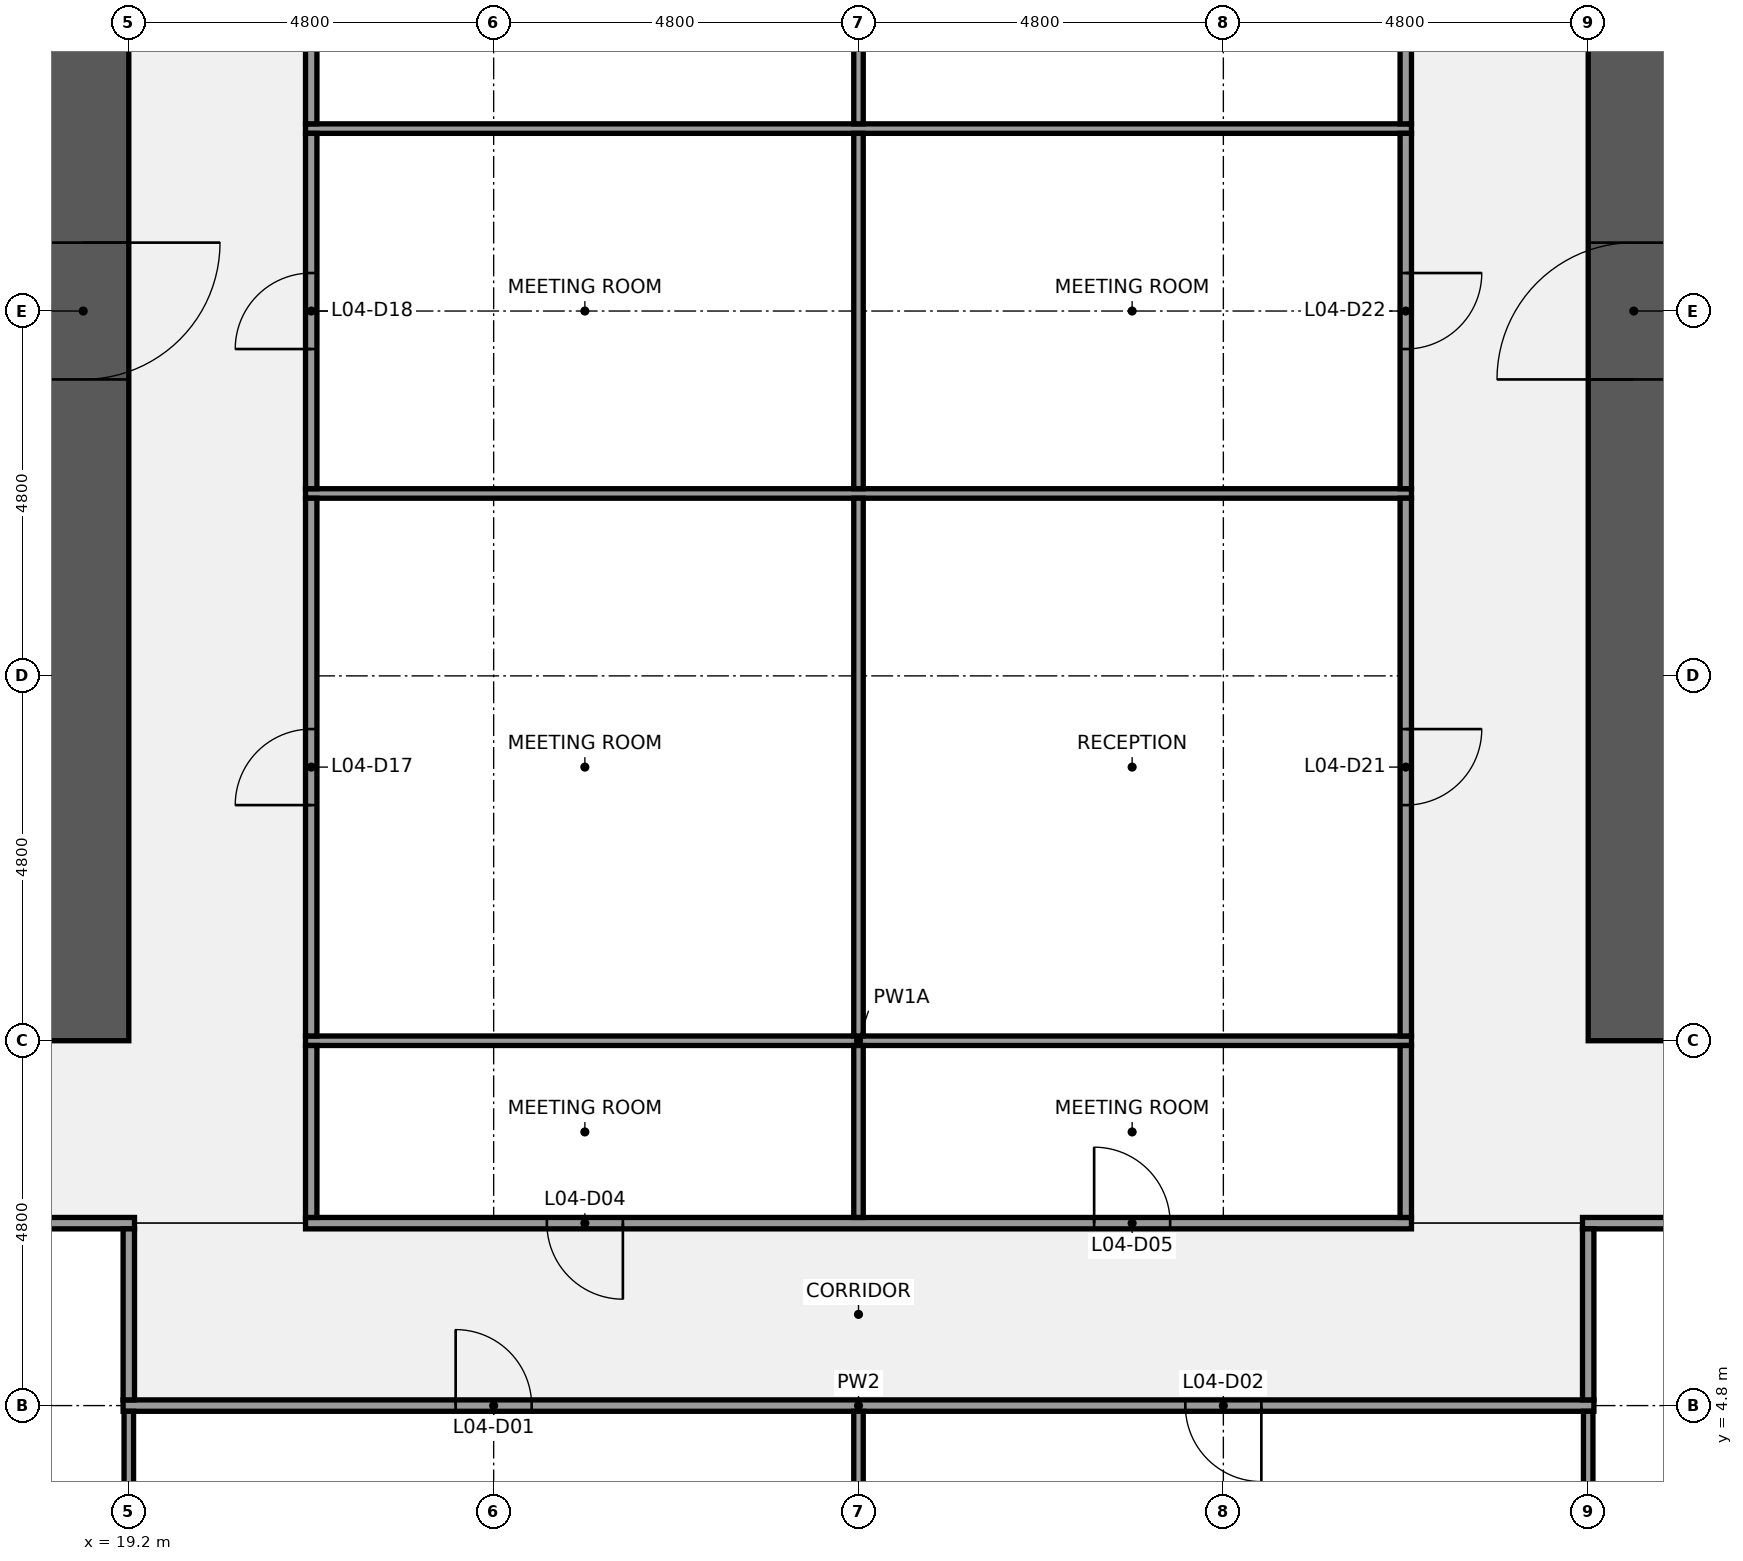
"""IFC4 building model, lengths in metres.
Left out: names, types, materials, properties, quantities, classifications, styles, units other than length and angle.
Written with IfcOpenShell. Run it as: python <this file> out.ifc"""

import sys

from ifc_helpers import new_model, si_unit, direction, frame, frame_2d, origin, place, context, subcontext, project, spatial, rectangle, extrude, element, fill, save


model = new_model("IFC4")
c1 = context("Model", 3, precision=1e-05, world=origin(), true_north=direction((0.0, 1.0)))
c2 = subcontext(c1, "Body", "Model", "MODEL_VIEW")
j1 = project(units=[si_unit("LENGTHUNIT", "METRE"), si_unit("PLANEANGLEUNIT", "RADIAN")], contexts=[c1])
p1 = place(None, origin())
s1 = spatial("IfcSite", under=j1, at=p1, CompositionType="ELEMENT")
p2 = place(p1, origin())
s2 = spatial("IfcBuilding", under=s1, at=p2, CompositionType="ELEMENT")
p3 = place(p2, frame((0.0, 0.0, 25.8)))
s3 = spatial("IfcBuildingStorey", under=s2, at=p3, CompositionType="ELEMENT", Elevation=25.8)
p4 = place(p3, frame((18.6, 38.4, 0.0), z_axis=(0.0, 0.0, 1.0), x_axis=(0.0, -1.0, 0.0)))
e1 = element("IfcWall", 1, at=p4, inside=s3, PredefinedType="SHEAR", context=c2, shape_type="SweptSolid", body=[
    extrude(rectangle(XDim=28.8, YDim=1.2, at=frame_2d((14.4, 0.0))), origin(), (0.0, 0.0, 1.0), 4.24),
])
p5 = place(p4, frame((18.3, 0.0, 0.0)))
e2 = element("IfcOpeningElement", 2, at=p5, cuts=e1, PredefinedType="OPENING", context=c2, shape_type="SweptSolid", body=[
    extrude(rectangle(XDim=1.8, YDim=2.1, at=frame_2d((0.9, 1.05))), frame((0.0, 0.61, 0.0), z_axis=(0.0, -1.0, 0.0), x_axis=(1.0, 0.0, 0.0)), (0.0, 0.0, 1.0), 1.22),
])
p6 = place(p4, frame((8.7, 0.0, 0.0)))
e3 = element("IfcOpeningElement", 3, at=p6, cuts=e1, PredefinedType="OPENING", context=c2, shape_type="SweptSolid", body=[
    extrude(rectangle(XDim=1.8, YDim=2.1, at=frame_2d((0.9, 1.05))), frame((0.0, 0.61, 0.0), z_axis=(0.0, -1.0, 0.0), x_axis=(1.0, 0.0, 0.0)), (0.0, 0.0, 1.0), 1.22),
])
p7 = place(p3, frame((39.0, 9.6, 0.0), z_axis=(0.0, 0.0, 1.0), x_axis=(0.0, 1.0, 0.0)))
e4 = element("IfcWall", 4, at=p7, inside=s3, PredefinedType="SHEAR", context=c2, shape_type="SweptSolid", body=[
    extrude(rectangle(XDim=28.8, YDim=1.2, at=frame_2d((14.4, 0.0))), origin(), (0.0, 0.0, 1.0), 4.24),
])
p8 = place(p7, frame((8.7, 0.0, 0.0)))
e5 = element("IfcOpeningElement", 5, at=p8, cuts=e4, PredefinedType="OPENING", context=c2, shape_type="SweptSolid", body=[
    extrude(rectangle(XDim=1.8, YDim=2.1, at=frame_2d((0.9, 1.05))), frame((0.0, 0.61, 0.0), z_axis=(0.0, -1.0, 0.0), x_axis=(1.0, 0.0, 0.0)), (0.0, 0.0, 1.0), 1.22),
])
p9 = place(p7, frame((18.3, 0.0, 0.0)))
e6 = element("IfcOpeningElement", 6, at=p9, cuts=e4, PredefinedType="OPENING", context=c2, shape_type="SweptSolid", body=[
    extrude(rectangle(XDim=1.8, YDim=2.1, at=frame_2d((0.9, 1.05))), frame((0.0, 0.61, 0.0), z_axis=(0.0, -1.0, 0.0), x_axis=(1.0, 0.0, 0.0)), (0.0, 0.0, 1.0), 1.22),
])
p10 = place(p3, frame((19.125, 4.8, 0.0), z_axis=(0.0, 0.0, 1.0), x_axis=(1.0, 0.0, 0.0)))
e7 = element("IfcWall", 7, at=p10, inside=s3, PredefinedType="PARTITIONING", context=c2, shape_type="SweptSolid", body=[
    extrude(rectangle(XDim=19.35, YDim=0.15, at=frame_2d((9.675, 0.0))), origin(), (0.0, 0.0, 1.0), 3.27),
])
p11 = place(p10, frame((4.375, 0.0, 0.0)))
e8 = element("IfcOpeningElement", 8, at=p11, cuts=e7, PredefinedType="OPENING", context=c2, shape_type="SweptSolid", body=[
    extrude(rectangle(XDim=1.0, YDim=2.1, at=frame_2d((0.5, 1.05))), frame((0.0, 0.085, 0.0), z_axis=(0.0, -1.0, 0.0), x_axis=(1.0, 0.0, 0.0)), (0.0, 0.0, 1.0), 0.17),
])
p12 = place(p10, frame((13.975, 0.0, 0.0)))
e9 = element("IfcOpeningElement", 9, at=p12, cuts=e7, PredefinedType="OPENING", context=c2, shape_type="SweptSolid", body=[
    extrude(rectangle(XDim=1.0, YDim=2.1, at=frame_2d((0.5, 1.05))), frame((0.0, 0.085, 0.0), z_axis=(0.0, -1.0, 0.0), x_axis=(1.0, 0.0, 0.0)), (0.0, 0.0, 1.0), 0.17),
])
p13 = place(p3, frame((14.325, 7.2, 0.0), z_axis=(0.0, 0.0, 1.0), x_axis=(1.0, 0.0, 0.0)))
e10 = element("IfcWall", 10, at=p13, inside=s3, PredefinedType="PARTITIONING", context=c2, shape_type="SweptSolid", body=[
    extrude(rectangle(XDim=4.95, YDim=0.15, at=frame_2d((2.475, 0.0))), origin(), (0.0, 0.0, 1.0), 3.27),
])
p14 = place(p13, frame((1.975, 0.0, 0.0)))
e11 = element("IfcOpeningElement", 11, at=p14, cuts=e10, PredefinedType="OPENING", context=c2, shape_type="SweptSolid", body=[
    extrude(rectangle(XDim=1.0, YDim=2.1, at=frame_2d((0.5, 1.05))), frame((0.0, 0.085, 0.0), z_axis=(0.0, -1.0, 0.0), x_axis=(1.0, 0.0, 0.0)), (0.0, 0.0, 1.0), 0.17),
])
p15 = place(p3, frame((21.525, 7.2, 0.0), z_axis=(0.0, 0.0, 1.0), x_axis=(1.0, 0.0, 0.0)))
e12 = element("IfcWall", 12, at=p15, inside=s3, PredefinedType="PARTITIONING", context=c2, shape_type="SweptSolid", body=[
    extrude(rectangle(XDim=14.55, YDim=0.15, at=frame_2d((7.275, 0.0))), origin(), (0.0, 0.0, 1.0), 3.27),
])
p16 = place(p15, frame((3.175, 0.0, 0.0)))
e13 = element("IfcOpeningElement", 13, at=p16, cuts=e12, PredefinedType="OPENING", context=c2, shape_type="SweptSolid", body=[
    extrude(rectangle(XDim=1.0, YDim=2.1, at=frame_2d((0.5, 1.05))), frame((0.0, 0.085, 0.0), z_axis=(0.0, -1.0, 0.0), x_axis=(1.0, 0.0, 0.0)), (0.0, 0.0, 1.0), 0.17),
])
p17 = place(p15, frame((10.375, 0.0, 0.0)))
e14 = element("IfcOpeningElement", 14, at=p17, cuts=e12, PredefinedType="OPENING", context=c2, shape_type="SweptSolid", body=[
    extrude(rectangle(XDim=1.0, YDim=2.1, at=frame_2d((0.5, 1.05))), frame((0.0, 0.085, 0.0), z_axis=(0.0, -1.0, 0.0), x_axis=(1.0, 0.0, 0.0)), (0.0, 0.0, 1.0), 0.17),
])
p18 = place(p3, frame((38.325, 7.2, 0.0), z_axis=(0.0, 0.0, 1.0), x_axis=(1.0, 0.0, 0.0)))
e15 = element("IfcWall", 15, at=p18, inside=s3, PredefinedType="PARTITIONING", context=c2, shape_type="SweptSolid", body=[
    extrude(rectangle(XDim=4.95, YDim=0.15, at=frame_2d((2.475, 0.0))), origin(), (0.0, 0.0, 1.0), 3.27),
])
p19 = place(p18, frame((1.975, 0.0, 0.0)))
e16 = element("IfcOpeningElement", 16, at=p19, cuts=e15, PredefinedType="OPENING", context=c2, shape_type="SweptSolid", body=[
    extrude(rectangle(XDim=1.0, YDim=2.1, at=frame_2d((0.5, 1.05))), frame((0.0, 0.085, 0.0), z_axis=(0.0, -1.0, 0.0), x_axis=(1.0, 0.0, 0.0)), (0.0, 0.0, 1.0), 0.17),
])
for number, where, z_axis, x_axis in (
    (17, (21.525, 9.6, 0.0), (0.0, 0.0, 1.0), (1.0, 0.0, 0.0)),
    (18, (21.525, 16.8, 0.0), (0.0, 0.0, 1.0), (1.0, 0.0, 0.0)),
    (19, (21.525, 21.6, 0.0), (0.0, 0.0, 1.0), (1.0, 0.0, 0.0)),
):
    element("IfcWall", number, at=place(p3, frame(where, z_axis=z_axis, x_axis=x_axis)), inside=s3, PredefinedType="PARTITIONING", context=c2, shape_type="SweptSolid", body=[
        extrude(rectangle(XDim=14.55, YDim=0.125, at=frame_2d((7.275, 0.0))), origin(), (0.0, 0.0, 1.0), 3.27),
    ])
p20 = place(p3, frame((19.2, 0.65, 0.0), z_axis=(0.0, 0.0, 1.0), x_axis=(0.0, 1.0, 0.0)))
e20 = element("IfcWall", 20, at=p20, inside=s3, PredefinedType="PARTITIONING", context=c2, shape_type="SweptSolid", body=[
    extrude(rectangle(XDim=4.075, YDim=0.125, at=frame_2d((2.038, 0.0))), origin(), (0.0, 0.0, 1.0), 3.27),
])
p21 = place(p3, frame((19.2, 4.875, 0.0), z_axis=(0.0, 0.0, 1.0), x_axis=(0.0, 1.0, 0.0)))
e21 = element("IfcWall", 21, at=p21, inside=s3, PredefinedType="PARTITIONING", context=c2, shape_type="SweptSolid", body=[
    extrude(rectangle(XDim=2.25, YDim=0.15, at=frame_2d((1.125, 0.0))), origin(), (0.0, 0.0, 1.0), 3.27),
])
p22 = place(p3, frame((21.6, 7.275, 0.0), z_axis=(0.0, 0.0, 1.0), x_axis=(0.0, 1.0, 0.0)))
e22 = element("IfcWall", 22, at=p22, inside=s3, PredefinedType="PARTITIONING", context=c2, shape_type="SweptSolid", body=[
    extrude(rectangle(XDim=2.263, YDim=0.15, at=frame_2d((1.131, 0.0))), origin(), (0.0, 0.0, 1.0), 3.27),
])
p23 = place(p3, frame((21.6, 9.663, 0.0), z_axis=(0.0, 0.0, 1.0), x_axis=(0.0, 1.0, 0.0)))
e23 = element("IfcWall", 23, at=p23, inside=s3, PredefinedType="PARTITIONING", context=c2, shape_type="SweptSolid", body=[
    extrude(rectangle(XDim=7.075, YDim=0.15, at=frame_2d((3.538, 0.0))), origin(), (0.0, 0.0, 1.0), 3.27),
])
p24 = place(p23, frame((3.038, 0.0, 0.0)))
e24 = element("IfcOpeningElement", 24, at=p24, cuts=e23, PredefinedType="OPENING", context=c2, shape_type="SweptSolid", body=[
    extrude(rectangle(XDim=1.0, YDim=2.1, at=frame_2d((0.5, 1.05))), frame((0.0, 0.085, 0.0), z_axis=(0.0, -1.0, 0.0), x_axis=(1.0, 0.0, 0.0)), (0.0, 0.0, 1.0), 0.17),
])
p25 = place(p3, frame((21.6, 16.863, 0.0), z_axis=(0.0, 0.0, 1.0), x_axis=(0.0, 1.0, 0.0)))
e25 = element("IfcWall", 25, at=p25, inside=s3, PredefinedType="PARTITIONING", context=c2, shape_type="SweptSolid", body=[
    extrude(rectangle(XDim=4.675, YDim=0.15, at=frame_2d((2.337, 0.0))), origin(), (0.0, 0.0, 1.0), 3.27),
])
p26 = place(p25, frame((1.837, 0.0, 0.0)))
e26 = element("IfcOpeningElement", 26, at=p26, cuts=e25, PredefinedType="OPENING", context=c2, shape_type="SweptSolid", body=[
    extrude(rectangle(XDim=1.0, YDim=2.1, at=frame_2d((0.5, 1.05))), frame((0.0, 0.085, 0.0), z_axis=(0.0, -1.0, 0.0), x_axis=(1.0, 0.0, 0.0)), (0.0, 0.0, 1.0), 0.17),
])
p27 = place(p3, frame((21.6, 21.663, 0.0), z_axis=(0.0, 0.0, 1.0), x_axis=(0.0, 1.0, 0.0)))
e27 = element("IfcWall", 27, at=p27, inside=s3, PredefinedType="PARTITIONING", context=c2, shape_type="SweptSolid", body=[
    extrude(rectangle(XDim=7.075, YDim=0.15, at=frame_2d((3.538, 0.0))), origin(), (0.0, 0.0, 1.0), 3.27),
])
p28 = place(p27, frame((3.038, 0.0, 0.0)))
e28 = element("IfcOpeningElement", 28, at=p28, cuts=e27, PredefinedType="OPENING", context=c2, shape_type="SweptSolid", body=[
    extrude(rectangle(XDim=1.0, YDim=2.1, at=frame_2d((0.5, 1.05))), frame((0.0, 0.085, 0.0), z_axis=(0.0, -1.0, 0.0), x_axis=(1.0, 0.0, 0.0)), (0.0, 0.0, 1.0), 0.17),
])
p29 = place(p3, frame((28.8, 0.65, 0.0), z_axis=(0.0, 0.0, 1.0), x_axis=(0.0, 1.0, 0.0)))
e29 = element("IfcWall", 29, at=p29, inside=s3, PredefinedType="PARTITIONING", context=c2, shape_type="SweptSolid", body=[
    extrude(rectangle(XDim=4.075, YDim=0.125, at=frame_2d((2.038, 0.0))), origin(), (0.0, 0.0, 1.0), 3.27),
])
p30 = place(p3, frame((28.8, 7.275, 0.0), z_axis=(0.0, 0.0, 1.0), x_axis=(0.0, 1.0, 0.0)))
e30 = element("IfcWall", 30, at=p30, inside=s3, PredefinedType="PARTITIONING", context=c2, shape_type="SweptSolid", body=[
    extrude(rectangle(XDim=2.263, YDim=0.125, at=frame_2d((1.131, 0.0))), origin(), (0.0, 0.0, 1.0), 3.27),
])
p31 = place(p3, frame((28.8, 9.663, 0.0), z_axis=(0.0, 0.0, 1.0), x_axis=(0.0, 1.0, 0.0)))
e31 = element("IfcWall", 31, at=p31, inside=s3, PredefinedType="PARTITIONING", context=c2, shape_type="SweptSolid", body=[
    extrude(rectangle(XDim=7.075, YDim=0.125, at=frame_2d((3.538, 0.0))), origin(), (0.0, 0.0, 1.0), 3.27),
])
p32 = place(p3, frame((28.8, 16.863, 0.0), z_axis=(0.0, 0.0, 1.0), x_axis=(0.0, 1.0, 0.0)))
e32 = element("IfcWall", 32, at=p32, inside=s3, PredefinedType="PARTITIONING", context=c2, shape_type="SweptSolid", body=[
    extrude(rectangle(XDim=4.675, YDim=0.125, at=frame_2d((2.337, 0.0))), origin(), (0.0, 0.0, 1.0), 3.27),
])
p33 = place(p3, frame((28.8, 21.663, 0.0), z_axis=(0.0, 0.0, 1.0), x_axis=(0.0, 1.0, 0.0)))
e33 = element("IfcWall", 33, at=p33, inside=s3, PredefinedType="PARTITIONING", context=c2, shape_type="SweptSolid", body=[
    extrude(rectangle(XDim=7.075, YDim=0.125, at=frame_2d((3.538, 0.0))), origin(), (0.0, 0.0, 1.0), 3.27),
])
p34 = place(p3, frame((36.0, 7.275, 0.0), z_axis=(0.0, 0.0, 1.0), x_axis=(0.0, 1.0, 0.0)))
e34 = element("IfcWall", 34, at=p34, inside=s3, PredefinedType="PARTITIONING", context=c2, shape_type="SweptSolid", body=[
    extrude(rectangle(XDim=2.263, YDim=0.15, at=frame_2d((1.131, 0.0))), origin(), (0.0, 0.0, 1.0), 3.27),
])
p35 = place(p3, frame((36.0, 9.663, 0.0), z_axis=(0.0, 0.0, 1.0), x_axis=(0.0, 1.0, 0.0)))
e35 = element("IfcWall", 35, at=p35, inside=s3, PredefinedType="PARTITIONING", context=c2, shape_type="SweptSolid", body=[
    extrude(rectangle(XDim=7.075, YDim=0.15, at=frame_2d((3.538, 0.0))), origin(), (0.0, 0.0, 1.0), 3.27),
])
p36 = place(p35, frame((3.038, 0.0, 0.0)))
e36 = element("IfcOpeningElement", 36, at=p36, cuts=e35, PredefinedType="OPENING", context=c2, shape_type="SweptSolid", body=[
    extrude(rectangle(XDim=1.0, YDim=2.1, at=frame_2d((0.5, 1.05))), frame((0.0, 0.085, 0.0), z_axis=(0.0, -1.0, 0.0), x_axis=(1.0, 0.0, 0.0)), (0.0, 0.0, 1.0), 0.17),
])
p37 = place(p3, frame((36.0, 16.863, 0.0), z_axis=(0.0, 0.0, 1.0), x_axis=(0.0, 1.0, 0.0)))
e37 = element("IfcWall", 37, at=p37, inside=s3, PredefinedType="PARTITIONING", context=c2, shape_type="SweptSolid", body=[
    extrude(rectangle(XDim=4.675, YDim=0.15, at=frame_2d((2.337, 0.0))), origin(), (0.0, 0.0, 1.0), 3.27),
])
p38 = place(p37, frame((1.837, 0.0, 0.0)))
e38 = element("IfcOpeningElement", 38, at=p38, cuts=e37, PredefinedType="OPENING", context=c2, shape_type="SweptSolid", body=[
    extrude(rectangle(XDim=1.0, YDim=2.1, at=frame_2d((0.5, 1.05))), frame((0.0, 0.085, 0.0), z_axis=(0.0, -1.0, 0.0), x_axis=(1.0, 0.0, 0.0)), (0.0, 0.0, 1.0), 0.17),
])
p39 = place(p3, frame((36.0, 21.663, 0.0), z_axis=(0.0, 0.0, 1.0), x_axis=(0.0, 1.0, 0.0)))
e39 = element("IfcWall", 39, at=p39, inside=s3, PredefinedType="PARTITIONING", context=c2, shape_type="SweptSolid", body=[
    extrude(rectangle(XDim=7.075, YDim=0.15, at=frame_2d((3.538, 0.0))), origin(), (0.0, 0.0, 1.0), 3.27),
])
p40 = place(p39, frame((3.038, 0.0, 0.0)))
e40 = element("IfcOpeningElement", 40, at=p40, cuts=e39, PredefinedType="OPENING", context=c2, shape_type="SweptSolid", body=[
    extrude(rectangle(XDim=1.0, YDim=2.1, at=frame_2d((0.5, 1.05))), frame((0.0, 0.085, 0.0), z_axis=(0.0, -1.0, 0.0), x_axis=(1.0, 0.0, 0.0)), (0.0, 0.0, 1.0), 0.17),
])
p41 = place(p3, frame((38.4, 0.65, 0.0), z_axis=(0.0, 0.0, 1.0), x_axis=(0.0, 1.0, 0.0)))
e41 = element("IfcWall", 41, at=p41, inside=s3, PredefinedType="PARTITIONING", context=c2, shape_type="SweptSolid", body=[
    extrude(rectangle(XDim=4.075, YDim=0.125, at=frame_2d((2.038, 0.0))), origin(), (0.0, 0.0, 1.0), 3.27),
])
p42 = place(p3, frame((38.4, 4.875, 0.0), z_axis=(0.0, 0.0, 1.0), x_axis=(0.0, 1.0, 0.0)))
e42 = element("IfcWall", 42, at=p42, inside=s3, PredefinedType="PARTITIONING", context=c2, shape_type="SweptSolid", body=[
    extrude(rectangle(XDim=2.25, YDim=0.15, at=frame_2d((1.125, 0.0))), origin(), (0.0, 0.0, 1.0), 3.27),
])
p43 = place(p5, origin())
e43 = element("IfcDoor", 43, at=p43, inside=s3, OperationType="DOUBLE_DOOR_SINGLE_SWING", PredefinedType="DOOR", context=c2, shape_type="SweptSolid", body=[
    extrude(rectangle(XDim=1.8, YDim=2.1, at=frame_2d((0.9, 1.05))), frame((0.0, 0.025, 0.0), z_axis=(0.0, -1.0, 0.0), x_axis=(1.0, 0.0, 0.0)), (0.0, 0.0, 1.0), 0.05),
])
fill(e2, e43)
p44 = place(p8, origin())
e44 = element("IfcDoor", 44, at=p44, inside=s3, OperationType="DOUBLE_DOOR_SINGLE_SWING", PredefinedType="DOOR", context=c2, shape_type="SweptSolid", body=[
    extrude(rectangle(XDim=1.8, YDim=2.1, at=frame_2d((0.9, 1.05))), frame((0.0, 0.025, 0.0), z_axis=(0.0, -1.0, 0.0), x_axis=(1.0, 0.0, 0.0)), (0.0, 0.0, 1.0), 0.05),
])
fill(e5, e44)
p45 = place(p11, origin())
e45 = element("IfcDoor", 45, at=p45, inside=s3, OperationType="SINGLE_SWING_LEFT", PredefinedType="DOOR", context=c2, shape_type="SweptSolid", body=[
    extrude(rectangle(XDim=1.0, YDim=2.1, at=frame_2d((0.5, 1.05))), frame((0.0, 0.025, 0.0), z_axis=(0.0, -1.0, 0.0), x_axis=(1.0, 0.0, 0.0)), (0.0, 0.0, 1.0), 0.05),
])
fill(e8, e45)
p46 = place(p12, origin())
e46 = element("IfcDoor", 46, at=p46, inside=s3, OperationType="SINGLE_SWING_RIGHT", PredefinedType="DOOR", context=c2, shape_type="SweptSolid", body=[
    extrude(rectangle(XDim=1.0, YDim=2.1, at=frame_2d((0.5, 1.05))), frame((0.0, 0.025, 0.0), z_axis=(0.0, -1.0, 0.0), x_axis=(1.0, 0.0, 0.0)), (0.0, 0.0, 1.0), 0.05),
])
fill(e9, e46)
p47 = place(p16, origin())
e47 = element("IfcDoor", 47, at=p47, inside=s3, OperationType="SINGLE_SWING_RIGHT", PredefinedType="DOOR", context=c2, shape_type="SweptSolid", body=[
    extrude(rectangle(XDim=1.0, YDim=2.1, at=frame_2d((0.5, 1.05))), frame((0.0, 0.025, 0.0), z_axis=(0.0, -1.0, 0.0), x_axis=(1.0, 0.0, 0.0)), (0.0, 0.0, 1.0), 0.05),
])
fill(e13, e47)
p48 = place(p17, origin())
e48 = element("IfcDoor", 48, at=p48, inside=s3, OperationType="SINGLE_SWING_LEFT", PredefinedType="DOOR", context=c2, shape_type="SweptSolid", body=[
    extrude(rectangle(XDim=1.0, YDim=2.1, at=frame_2d((0.5, 1.05))), frame((0.0, 0.025, 0.0), z_axis=(0.0, -1.0, 0.0), x_axis=(1.0, 0.0, 0.0)), (0.0, 0.0, 1.0), 0.05),
])
fill(e14, e48)
p49 = place(p24, origin())
e49 = element("IfcDoor", 49, at=p49, inside=s3, OperationType="SINGLE_SWING_LEFT", PredefinedType="DOOR", context=c2, shape_type="SweptSolid", body=[
    extrude(rectangle(XDim=1.0, YDim=2.1, at=frame_2d((0.5, 1.05))), frame((0.0, 0.025, 0.0), z_axis=(0.0, -1.0, 0.0), x_axis=(1.0, 0.0, 0.0)), (0.0, 0.0, 1.0), 0.05),
])
fill(e24, e49)
p50 = place(p26, origin())
e50 = element("IfcDoor", 50, at=p50, inside=s3, OperationType="SINGLE_SWING_LEFT", PredefinedType="DOOR", context=c2, shape_type="SweptSolid", body=[
    extrude(rectangle(XDim=1.0, YDim=2.1, at=frame_2d((0.5, 1.05))), frame((0.0, 0.025, 0.0), z_axis=(0.0, -1.0, 0.0), x_axis=(1.0, 0.0, 0.0)), (0.0, 0.0, 1.0), 0.05),
])
fill(e26, e50)
p51 = place(p36, origin())
e51 = element("IfcDoor", 51, at=p51, inside=s3, OperationType="SINGLE_SWING_RIGHT", PredefinedType="DOOR", context=c2, shape_type="SweptSolid", body=[
    extrude(rectangle(XDim=1.0, YDim=2.1, at=frame_2d((0.5, 1.05))), frame((0.0, 0.025, 0.0), z_axis=(0.0, -1.0, 0.0), x_axis=(1.0, 0.0, 0.0)), (0.0, 0.0, 1.0), 0.05),
])
fill(e36, e51)
p52 = place(p38, origin())
e52 = element("IfcDoor", 52, at=p52, inside=s3, OperationType="SINGLE_SWING_RIGHT", PredefinedType="DOOR", context=c2, shape_type="SweptSolid", body=[
    extrude(rectangle(XDim=1.0, YDim=2.1, at=frame_2d((0.5, 1.05))), frame((0.0, 0.025, 0.0), z_axis=(0.0, -1.0, 0.0), x_axis=(1.0, 0.0, 0.0)), (0.0, 0.0, 1.0), 0.05),
])
fill(e38, e52)
save(model, sys.argv[1])
